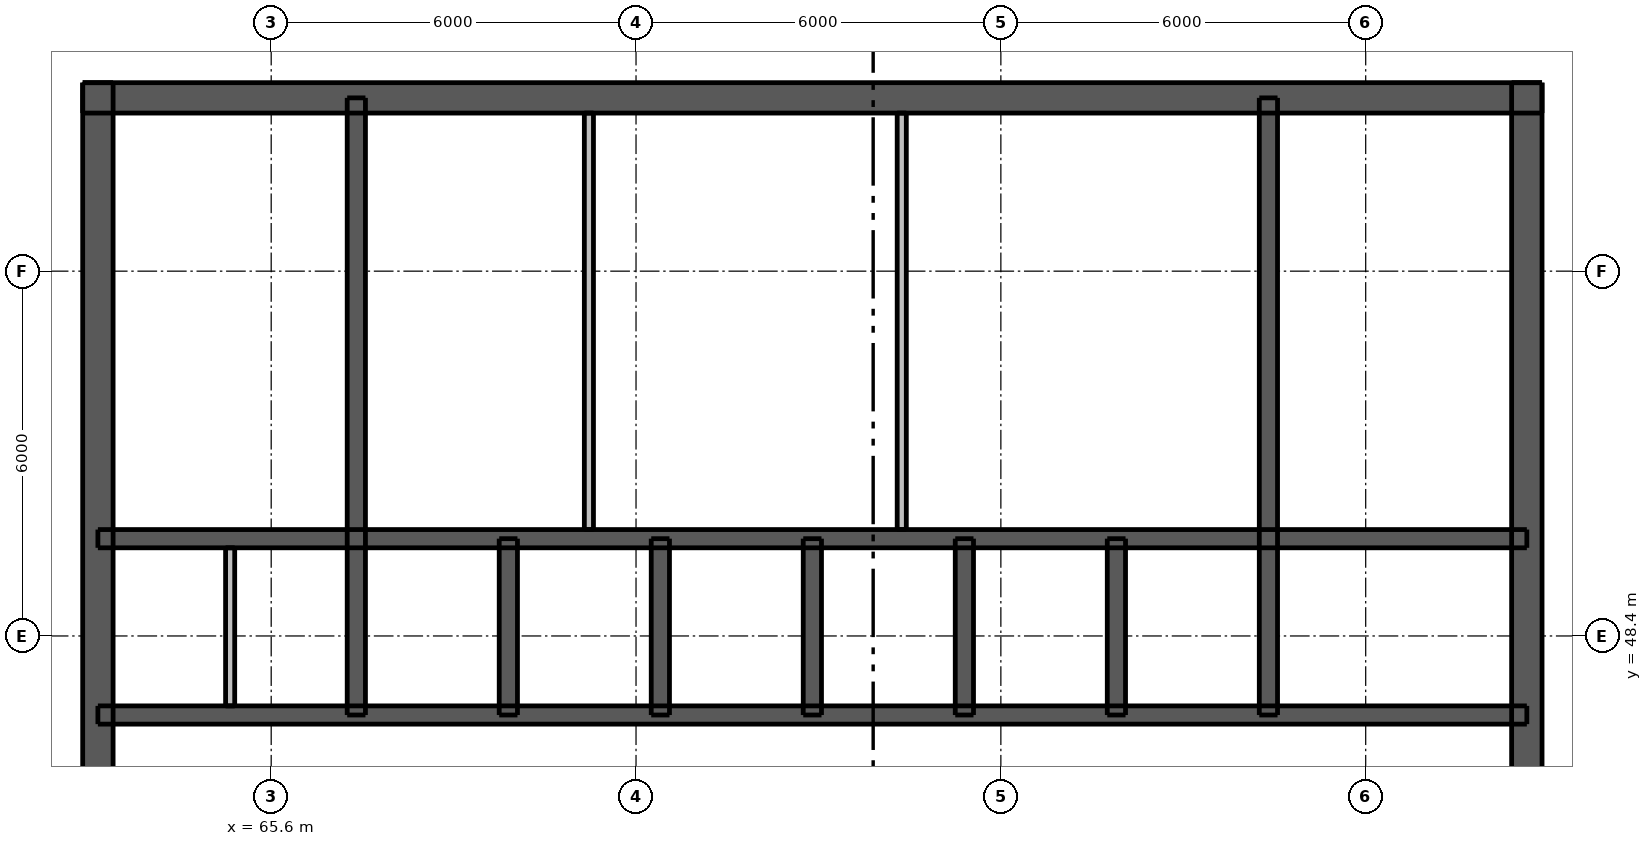
"""IFC4 building model, lengths in metres.
Left out: names, types, materials, properties, quantities, classifications, styles, units other than length and angle.
Written with IfcOpenShell. Run it as: python <this file> out.ifc"""

import sys

from ifc_helpers import new_model, si_unit, direction, frame, frame_2d, origin, place, context, subcontext, project, spatial, rectangle, extrude, element, fill, save


model = new_model("IFC4")
c1 = context("Model", 3, precision=1e-05, world=origin(), true_north=direction((0.0, 1.0)))
c2 = subcontext(c1, "Body", "Model", "MODEL_VIEW")
j1 = project(units=[si_unit("LENGTHUNIT", "METRE"), si_unit("PLANEANGLEUNIT", "RADIAN")], contexts=[c1])
p1 = place(None, origin())
s1 = spatial("IfcSite", under=j1, at=p1, CompositionType="ELEMENT")
p2 = place(p1, origin())
s2 = spatial("IfcBuilding", under=s1, at=p2, CompositionType="ELEMENT")
p3 = place(p2, frame((0.0, 0.0, 278.5)))
s3 = spatial("IfcBuildingStorey", under=s2, at=p3, CompositionType="ELEMENT", Elevation=278.5)
p4 = place(p3, frame((62.5, 57.25, 0.0), z_axis=(0.0, 0.0, 1.0), x_axis=(1.0, 0.0, 0.0)))
e1 = element("IfcWall", 1, at=p4, inside=s3, PredefinedType="SHEAR", context=c2, shape_type="SweptSolid", body=[
    extrude(rectangle(XDim=24.0, YDim=0.5, at=frame_2d((12.0, 0.0))), origin(), (0.0, 0.0, 1.0), 3.0),
])
p5 = place(p4, frame((21.025, 0.0, 0.0)))
e2 = element("IfcOpeningElement", 2, at=p5, cuts=e1, PredefinedType="OPENING", context=c2, shape_type="SweptSolid", body=[
    extrude(rectangle(XDim=1.1, YDim=2.1, at=frame_2d((0.55, 1.05))), frame((0.0, 0.26, 0.0), z_axis=(0.0, -1.0, 0.0), x_axis=(1.0, 0.0, 0.0)), (0.0, 0.0, 1.0), 0.52),
])
p6 = place(p4, frame((1.875, 0.0, 0.0)))
e3 = element("IfcOpeningElement", 3, at=p6, cuts=e1, PredefinedType="OPENING", context=c2, shape_type="SweptSolid", body=[
    extrude(rectangle(XDim=1.1, YDim=2.1, at=frame_2d((0.55, 1.05))), frame((0.0, 0.26, 0.0), z_axis=(0.0, -1.0, 0.0), x_axis=(1.0, 0.0, 0.0)), (0.0, 0.0, 1.0), 0.52),
])
p7 = place(p4, frame((6.038, 0.0, 0.0)))
e4 = element("IfcOpeningElement", 4, at=p7, cuts=e1, PredefinedType="OPENING", context=c2, shape_type="SweptSolid", body=[
    extrude(rectangle(XDim=0.9, YDim=2.1, at=frame_2d((0.45, 1.05))), frame((0.0, 0.26, 0.0), z_axis=(0.0, -1.0, 0.0), x_axis=(1.0, 0.0, 0.0)), (0.0, 0.0, 1.0), 0.52),
])
p8 = place(p4, frame((10.448, 0.0, 0.0)))
e5 = element("IfcOpeningElement", 5, at=p8, cuts=e1, PredefinedType="OPENING", context=c2, shape_type="SweptSolid", body=[
    extrude(rectangle(XDim=0.9, YDim=2.1, at=frame_2d((0.45, 1.05))), frame((0.0, 0.26, 0.0), z_axis=(0.0, -1.0, 0.0), x_axis=(1.0, 0.0, 0.0)), (0.0, 0.0, 1.0), 0.52),
])
p9 = place(p4, frame((15.96, 0.0, 0.0)))
e6 = element("IfcOpeningElement", 6, at=p9, cuts=e1, PredefinedType="OPENING", context=c2, shape_type="SweptSolid", body=[
    extrude(rectangle(XDim=0.9, YDim=2.1, at=frame_2d((0.45, 1.05))), frame((0.0, 0.26, 0.0), z_axis=(0.0, -1.0, 0.0), x_axis=(1.0, 0.0, 0.0)), (0.0, 0.0, 1.0), 0.52),
])
p10 = place(p3, frame((62.75, 33.5, 0.0), z_axis=(0.0, 0.0, 1.0), x_axis=(0.0, 1.0, 0.0)))
e7 = element("IfcWall", 7, at=p10, inside=s3, PredefinedType="SHEAR", context=c2, shape_type="SweptSolid", body=[
    extrude(rectangle(XDim=24.0, YDim=0.5, at=frame_2d((12.0, 0.0))), origin(), (0.0, 0.0, 1.0), 3.0),
])
p11 = place(p10, frame((11.2, 0.0, 0.0)))
e8 = element("IfcOpeningElement", 8, at=p11, cuts=e7, PredefinedType="OPENING", context=c2, shape_type="SweptSolid", body=[
    extrude(rectangle(XDim=1.6, YDim=2.1, at=frame_2d((0.8, 1.05))), frame((0.0, 0.26, 0.0), z_axis=(0.0, -1.0, 0.0), x_axis=(1.0, 0.0, 0.0)), (0.0, 0.0, 1.0), 0.52),
])
p12 = place(p3, frame((86.25, 33.5, 0.0), z_axis=(0.0, 0.0, 1.0), x_axis=(0.0, 1.0, 0.0)))
e9 = element("IfcWall", 9, at=p12, inside=s3, PredefinedType="SHEAR", context=c2, shape_type="SweptSolid", body=[
    extrude(rectangle(XDim=24.0, YDim=0.5, at=frame_2d((12.0, 0.0))), origin(), (0.0, 0.0, 1.0), 3.0),
])
p13 = place(p12, frame((11.2, 0.0, 0.0)))
e10 = element("IfcOpeningElement", 10, at=p13, cuts=e9, PredefinedType="OPENING", context=c2, shape_type="SweptSolid", body=[
    extrude(rectangle(XDim=1.6, YDim=2.1, at=frame_2d((0.8, 1.05))), frame((0.0, 0.26, 0.0), z_axis=(0.0, -1.0, 0.0), x_axis=(1.0, 0.0, 0.0)), (0.0, 0.0, 1.0), 0.52),
])
p14 = place(p3, frame((62.75, 47.1, 0.0), z_axis=(0.0, 0.0, 1.0), x_axis=(1.0, 0.0, 0.0)))
e11 = element("IfcWall", 11, at=p14, inside=s3, PredefinedType="SHEAR", context=c2, shape_type="SweptSolid", body=[
    extrude(rectangle(XDim=23.5, YDim=0.3, at=frame_2d((11.75, 0.0))), origin(), (0.0, 0.0, 1.0), 3.0),
])
p15 = place(p14, frame((0.762, 0.0, 0.0)))
e12 = element("IfcOpeningElement", 12, at=p15, cuts=e11, PredefinedType="OPENING", context=c2, shape_type="SweptSolid", body=[
    extrude(rectangle(XDim=0.9, YDim=2.1, at=frame_2d((0.45, 1.05))), frame((0.0, 0.16, 0.0), z_axis=(0.0, -1.0, 0.0), x_axis=(1.0, 0.0, 0.0)), (0.0, 0.0, 1.0), 0.32),
])
p16 = place(p14, frame((2.688, 0.0, 0.0)))
e13 = element("IfcOpeningElement", 13, at=p16, cuts=e11, PredefinedType="OPENING", context=c2, shape_type="SweptSolid", body=[
    extrude(rectangle(XDim=0.9, YDim=2.1, at=frame_2d((0.45, 1.05))), frame((0.0, 0.16, 0.0), z_axis=(0.0, -1.0, 0.0), x_axis=(1.0, 0.0, 0.0)), (0.0, 0.0, 1.0), 0.32),
])
p17 = place(p14, frame((20.875, 0.0, 0.0)))
e14 = element("IfcOpeningElement", 14, at=p17, cuts=e11, PredefinedType="OPENING", context=c2, shape_type="SweptSolid", body=[
    extrude(rectangle(XDim=0.9, YDim=2.1, at=frame_2d((0.45, 1.05))), frame((0.0, 0.16, 0.0), z_axis=(0.0, -1.0, 0.0), x_axis=(1.0, 0.0, 0.0)), (0.0, 0.0, 1.0), 0.32),
])
p18 = place(p14, frame((4.95, 0.0, 0.0)))
e15 = element("IfcOpeningElement", 15, at=p18, cuts=e11, PredefinedType="OPENING", context=c2, shape_type="SweptSolid", body=[
    extrude(rectangle(XDim=1.1, YDim=2.1, at=frame_2d((0.55, 1.05))), frame((0.0, 0.16, 0.0), z_axis=(0.0, -1.0, 0.0), x_axis=(1.0, 0.0, 0.0)), (0.0, 0.0, 1.0), 0.32),
])
p19 = place(p14, frame((7.45, 0.0, 0.0)))
e16 = element("IfcOpeningElement", 16, at=p19, cuts=e11, PredefinedType="OPENING", context=c2, shape_type="SweptSolid", body=[
    extrude(rectangle(XDim=1.1, YDim=2.1, at=frame_2d((0.55, 1.05))), frame((0.0, 0.16, 0.0), z_axis=(0.0, -1.0, 0.0), x_axis=(1.0, 0.0, 0.0)), (0.0, 0.0, 1.0), 0.32),
])
p20 = place(p14, frame((9.95, 0.0, 0.0)))
e17 = element("IfcOpeningElement", 17, at=p20, cuts=e11, PredefinedType="OPENING", context=c2, shape_type="SweptSolid", body=[
    extrude(rectangle(XDim=1.1, YDim=2.1, at=frame_2d((0.55, 1.05))), frame((0.0, 0.16, 0.0), z_axis=(0.0, -1.0, 0.0), x_axis=(1.0, 0.0, 0.0)), (0.0, 0.0, 1.0), 0.32),
])
p21 = place(p14, frame((12.45, 0.0, 0.0)))
e18 = element("IfcOpeningElement", 18, at=p21, cuts=e11, PredefinedType="OPENING", context=c2, shape_type="SweptSolid", body=[
    extrude(rectangle(XDim=1.1, YDim=2.1, at=frame_2d((0.55, 1.05))), frame((0.0, 0.16, 0.0), z_axis=(0.0, -1.0, 0.0), x_axis=(1.0, 0.0, 0.0)), (0.0, 0.0, 1.0), 0.32),
])
p22 = place(p14, frame((14.95, 0.0, 0.0)))
e19 = element("IfcOpeningElement", 19, at=p22, cuts=e11, PredefinedType="OPENING", context=c2, shape_type="SweptSolid", body=[
    extrude(rectangle(XDim=1.1, YDim=2.1, at=frame_2d((0.55, 1.05))), frame((0.0, 0.16, 0.0), z_axis=(0.0, -1.0, 0.0), x_axis=(1.0, 0.0, 0.0)), (0.0, 0.0, 1.0), 0.32),
])
p23 = place(p14, frame((17.45, 0.0, 0.0)))
e20 = element("IfcOpeningElement", 20, at=p23, cuts=e11, PredefinedType="OPENING", context=c2, shape_type="SweptSolid", body=[
    extrude(rectangle(XDim=1.1, YDim=2.1, at=frame_2d((0.55, 1.05))), frame((0.0, 0.16, 0.0), z_axis=(0.0, -1.0, 0.0), x_axis=(1.0, 0.0, 0.0)), (0.0, 0.0, 1.0), 0.32),
])
p24 = place(p3, frame((62.75, 50.0, 0.0), z_axis=(0.0, 0.0, 1.0), x_axis=(1.0, 0.0, 0.0)))
e21 = element("IfcWall", 21, at=p24, inside=s3, PredefinedType="SHEAR", context=c2, shape_type="SweptSolid", body=[
    extrude(rectangle(XDim=23.5, YDim=0.3, at=frame_2d((11.75, 0.0))), origin(), (0.0, 0.0, 1.0), 3.0),
])
for number, where, z_axis, x_axis in (
    (22, (67.0, 47.1, 0.0), (0.0, 0.0, 1.0), (0.0, 1.0, 0.0)),
    (23, (82.0, 47.1, 0.0), (0.0, 0.0, 1.0), (0.0, 1.0, 0.0)),
):
    element("IfcWall", number, at=place(p3, frame(where, z_axis=z_axis, x_axis=x_axis)), inside=s3, PredefinedType="SHEAR", context=c2, shape_type="SweptSolid", body=[
        extrude(rectangle(XDim=10.15, YDim=0.3, at=frame_2d((5.075, 0.0))), origin(), (0.0, 0.0, 1.0), 3.0),
    ])
for number, where, z_axis, x_axis in (
    (24, (69.5, 47.1, 0.0), (0.0, 0.0, 1.0), (0.0, 1.0, 0.0)),
    (25, (72.0, 47.1, 0.0), (0.0, 0.0, 1.0), (0.0, 1.0, 0.0)),
    (26, (74.5, 47.1, 0.0), (0.0, 0.0, 1.0), (0.0, 1.0, 0.0)),
    (27, (77.0, 47.1, 0.0), (0.0, 0.0, 1.0), (0.0, 1.0, 0.0)),
    (28, (79.5, 47.1, 0.0), (0.0, 0.0, 1.0), (0.0, 1.0, 0.0)),
):
    element("IfcWall", number, at=place(p3, frame(where, z_axis=z_axis, x_axis=x_axis)), inside=s3, PredefinedType="SHEAR", context=c2, shape_type="SweptSolid", body=[
        extrude(rectangle(XDim=2.9, YDim=0.3, at=frame_2d((1.45, 0.0))), origin(), (0.0, 0.0, 1.0), 3.0),
    ])
p25 = place(p3, frame((64.925, 47.25, 0.0), z_axis=(0.0, 0.0, 1.0), x_axis=(0.0, 1.0, 0.0)))
e29 = element("IfcWall", 29, at=p25, inside=s3, PredefinedType="PLUMBINGWALL", context=c2, shape_type="SweptSolid", body=[
    extrude(rectangle(XDim=2.6, YDim=0.15, at=frame_2d((1.3, 0.0))), origin(), (0.0, 0.0, 1.0), 3.0),
])
for number, where, z_axis, x_axis in (
    (30, (70.825, 50.15, 0.0), (0.0, 0.0, 1.0), (0.0, 1.0, 0.0)),
    (31, (75.97, 50.15, 0.0), (0.0, 0.0, 1.0), (0.0, 1.0, 0.0)),
):
    element("IfcWall", number, at=place(p3, frame(where, z_axis=z_axis, x_axis=x_axis)), inside=s3, PredefinedType="PLUMBINGWALL", context=c2, shape_type="SweptSolid", body=[
        extrude(rectangle(XDim=6.85, YDim=0.15, at=frame_2d((3.425, 0.0))), origin(), (0.0, 0.0, 1.0), 3.0),
    ])
p26 = place(p5, origin())
e32 = element("IfcDoor", 32, at=p26, inside=s3, OperationType="SINGLE_SWING_RIGHT", PredefinedType="DOOR", context=c2, shape_type="SweptSolid", body=[
    extrude(rectangle(XDim=1.1, YDim=2.1, at=frame_2d((0.55, 1.05))), frame((0.0, -0.188, 0.0), z_axis=(0.0, -1.0, 0.0), x_axis=(1.0, 0.0, 0.0)), (0.0, 0.0, 1.0), 0.05),
])
fill(e2, e32)
p27 = place(p6, origin())
e33 = element("IfcDoor", 33, at=p27, inside=s3, OperationType="SINGLE_SWING_LEFT", PredefinedType="DOOR", context=c2, shape_type="SweptSolid", body=[
    extrude(rectangle(XDim=1.1, YDim=2.1, at=frame_2d((0.55, 1.05))), frame((0.0, -0.188, 0.0), z_axis=(0.0, -1.0, 0.0), x_axis=(1.0, 0.0, 0.0)), (0.0, 0.0, 1.0), 0.05),
])
fill(e3, e33)
p28 = place(p11, origin())
e34 = element("IfcDoor", 34, at=p28, inside=s3, OperationType="DOUBLE_DOOR_SINGLE_SWING", PredefinedType="DOOR", context=c2, shape_type="SweptSolid", body=[
    extrude(rectangle(XDim=1.6, YDim=2.1, at=frame_2d((0.8, 1.05))), frame((0.0, -0.188, 0.0), z_axis=(0.0, -1.0, 0.0), x_axis=(1.0, 0.0, 0.0)), (0.0, 0.0, 1.0), 0.05),
])
fill(e8, e34)
p29 = place(p13, origin())
e35 = element("IfcDoor", 35, at=p29, inside=s3, OperationType="DOUBLE_DOOR_SINGLE_SWING", PredefinedType="DOOR", context=c2, shape_type="SweptSolid", body=[
    extrude(rectangle(XDim=1.6, YDim=2.1, at=frame_2d((0.8, 1.05))), frame((0.0, 0.237, 0.0), z_axis=(0.0, -1.0, 0.0), x_axis=(1.0, 0.0, 0.0)), (0.0, 0.0, 1.0), 0.05),
])
fill(e10, e35)
p30 = place(p15, origin())
e36 = element("IfcDoor", 36, at=p30, inside=s3, OperationType="SINGLE_SWING_LEFT", PredefinedType="DOOR", context=c2, shape_type="SweptSolid", body=[
    extrude(rectangle(XDim=0.9, YDim=2.1, at=frame_2d((0.45, 1.05))), frame((0.0, 0.138, 0.0), z_axis=(0.0, -1.0, 0.0), x_axis=(1.0, 0.0, 0.0)), (0.0, 0.0, 1.0), 0.05),
])
fill(e12, e36)
p31 = place(p16, origin())
e37 = element("IfcDoor", 37, at=p31, inside=s3, OperationType="SINGLE_SWING_RIGHT", PredefinedType="DOOR", context=c2, shape_type="SweptSolid", body=[
    extrude(rectangle(XDim=0.9, YDim=2.1, at=frame_2d((0.45, 1.05))), frame((0.0, 0.138, 0.0), z_axis=(0.0, -1.0, 0.0), x_axis=(1.0, 0.0, 0.0)), (0.0, 0.0, 1.0), 0.05),
])
fill(e13, e37)
p32 = place(p17, origin())
e38 = element("IfcDoor", 38, at=p32, inside=s3, OperationType="SINGLE_SWING_LEFT", PredefinedType="DOOR", context=c2, shape_type="SweptSolid", body=[
    extrude(rectangle(XDim=0.9, YDim=2.1, at=frame_2d((0.45, 1.05))), frame((0.0, 0.138, 0.0), z_axis=(0.0, -1.0, 0.0), x_axis=(1.0, 0.0, 0.0)), (0.0, 0.0, 1.0), 0.05),
])
fill(e14, e38)
p33 = place(p7, origin())
e39 = element("IfcDoor", 39, at=p33, inside=s3, OperationType="SINGLE_SWING_RIGHT", PredefinedType="DOOR", context=c2, shape_type="SweptSolid", body=[
    extrude(rectangle(XDim=0.9, YDim=2.1, at=frame_2d((0.45, 1.05))), frame((0.0, -0.188, 0.0), z_axis=(0.0, -1.0, 0.0), x_axis=(1.0, 0.0, 0.0)), (0.0, 0.0, 1.0), 0.05),
])
fill(e4, e39)
p34 = place(p8, origin())
e40 = element("IfcDoor", 40, at=p34, inside=s3, OperationType="SINGLE_SWING_RIGHT", PredefinedType="DOOR", context=c2, shape_type="SweptSolid", body=[
    extrude(rectangle(XDim=0.9, YDim=2.1, at=frame_2d((0.45, 1.05))), frame((0.0, -0.188, 0.0), z_axis=(0.0, -1.0, 0.0), x_axis=(1.0, 0.0, 0.0)), (0.0, 0.0, 1.0), 0.05),
])
fill(e5, e40)
p35 = place(p9, origin())
e41 = element("IfcDoor", 41, at=p35, inside=s3, OperationType="SINGLE_SWING_RIGHT", PredefinedType="DOOR", context=c2, shape_type="SweptSolid", body=[
    extrude(rectangle(XDim=0.9, YDim=2.1, at=frame_2d((0.45, 1.05))), frame((0.0, -0.188, 0.0), z_axis=(0.0, -1.0, 0.0), x_axis=(1.0, 0.0, 0.0)), (0.0, 0.0, 1.0), 0.05),
])
fill(e6, e41)
p36 = place(p18, origin())
e42 = element("IfcDoor", 42, at=p36, inside=s3, OperationType="DOUBLE_DOOR_SLIDING", PredefinedType="DOOR", context=c2, shape_type="SweptSolid", body=[
    extrude(rectangle(XDim=1.1, YDim=2.1, at=frame_2d((0.55, 1.05))), frame((0.0, 0.025, 0.0), z_axis=(0.0, -1.0, 0.0), x_axis=(1.0, 0.0, 0.0)), (0.0, 0.0, 1.0), 0.05),
])
fill(e15, e42)
p37 = place(p19, origin())
e43 = element("IfcDoor", 43, at=p37, inside=s3, OperationType="DOUBLE_DOOR_SLIDING", PredefinedType="DOOR", context=c2, shape_type="SweptSolid", body=[
    extrude(rectangle(XDim=1.1, YDim=2.1, at=frame_2d((0.55, 1.05))), frame((0.0, 0.025, 0.0), z_axis=(0.0, -1.0, 0.0), x_axis=(1.0, 0.0, 0.0)), (0.0, 0.0, 1.0), 0.05),
])
fill(e16, e43)
p38 = place(p20, origin())
e44 = element("IfcDoor", 44, at=p38, inside=s3, OperationType="DOUBLE_DOOR_SLIDING", PredefinedType="DOOR", context=c2, shape_type="SweptSolid", body=[
    extrude(rectangle(XDim=1.1, YDim=2.1, at=frame_2d((0.55, 1.05))), frame((0.0, 0.025, 0.0), z_axis=(0.0, -1.0, 0.0), x_axis=(1.0, 0.0, 0.0)), (0.0, 0.0, 1.0), 0.05),
])
fill(e17, e44)
p39 = place(p21, origin())
e45 = element("IfcDoor", 45, at=p39, inside=s3, OperationType="DOUBLE_DOOR_SLIDING", PredefinedType="DOOR", context=c2, shape_type="SweptSolid", body=[
    extrude(rectangle(XDim=1.1, YDim=2.1, at=frame_2d((0.55, 1.05))), frame((0.0, 0.025, 0.0), z_axis=(0.0, -1.0, 0.0), x_axis=(1.0, 0.0, 0.0)), (0.0, 0.0, 1.0), 0.05),
])
fill(e18, e45)
p40 = place(p22, origin())
e46 = element("IfcDoor", 46, at=p40, inside=s3, OperationType="DOUBLE_DOOR_SLIDING", PredefinedType="DOOR", context=c2, shape_type="SweptSolid", body=[
    extrude(rectangle(XDim=1.1, YDim=2.1, at=frame_2d((0.55, 1.05))), frame((0.0, 0.025, 0.0), z_axis=(0.0, -1.0, 0.0), x_axis=(1.0, 0.0, 0.0)), (0.0, 0.0, 1.0), 0.05),
])
fill(e19, e46)
p41 = place(p23, origin())
e47 = element("IfcDoor", 47, at=p41, inside=s3, OperationType="DOUBLE_DOOR_SLIDING", PredefinedType="DOOR", context=c2, shape_type="SweptSolid", body=[
    extrude(rectangle(XDim=1.1, YDim=2.1, at=frame_2d((0.55, 1.05))), frame((0.0, 0.025, 0.0), z_axis=(0.0, -1.0, 0.0), x_axis=(1.0, 0.0, 0.0)), (0.0, 0.0, 1.0), 0.05),
])
fill(e20, e47)
save(model, sys.argv[1])
